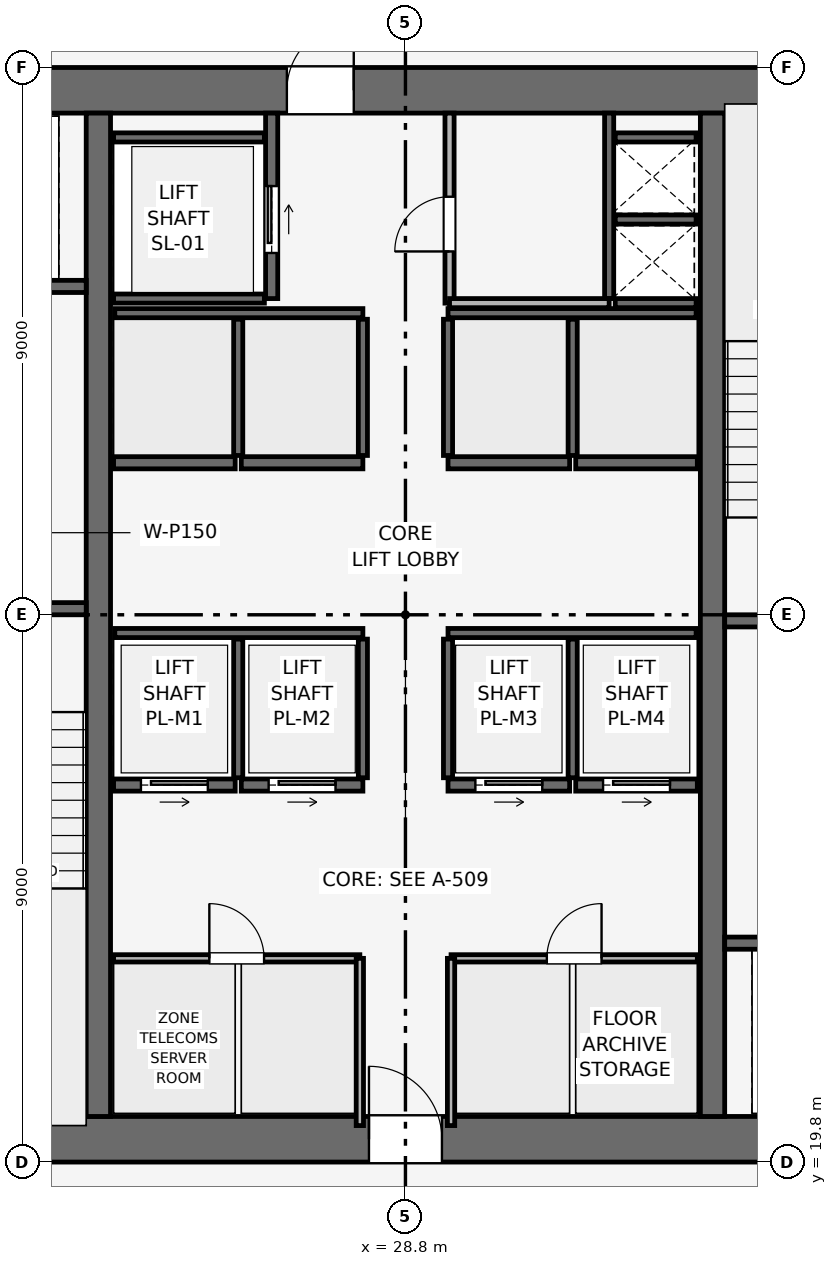
"""IFC4 building model, lengths in metres.
Left out: names, types, materials, properties, quantities, classifications, styles, units other than length and angle.
Written with IfcOpenShell. Run it as: python <this file> out.ifc"""

import sys

from ifc_helpers import new_model, si_unit, direction, frame, frame_2d, origin, place, context, subcontext, project, spatial, rectangle, extrude, element, fill, save


model = new_model("IFC4")
c1 = context("Model", 3, precision=1e-05, world=origin(), true_north=direction((0.0, 1.0)))
c2 = subcontext(c1, "Body", "Model", "MODEL_VIEW")
j1 = project(units=[si_unit("LENGTHUNIT", "METRE"), si_unit("PLANEANGLEUNIT", "RADIAN")], contexts=[c1])
p1 = place(None, origin())
s1 = spatial("IfcSite", under=j1, at=p1, CompositionType="ELEMENT")
p2 = place(p1, origin())
s2 = spatial("IfcBuilding", under=s1, at=p2, CompositionType="ELEMENT")
p3 = place(p2, frame((0.0, 0.0, 226.2)))
s3 = spatial("IfcBuildingStorey", under=s2, at=p3, CompositionType="ELEMENT", Elevation=226.2)
p4 = place(p3, frame((19.8, 20.175, 0.0), z_axis=(0.0, 0.0, 1.0), x_axis=(1.0, 0.0, 0.0)))
e1 = element("IfcWall", 1, at=p4, inside=s3, PredefinedType="SHEAR", context=c2, shape_type="SweptSolid", body=[
    extrude(rectangle(XDim=18.0, YDim=0.75, at=frame_2d((9.0, 0.0))), origin(), (0.0, 0.0, 1.0), 3.75),
])
p5 = place(p4, frame((8.4, 0.0, 0.0)))
e2 = element("IfcOpeningElement", 2, at=p5, cuts=e1, PredefinedType="OPENING", context=c2, shape_type="SweptSolid", body=[
    extrude(rectangle(XDim=1.2, YDim=2.2, at=frame_2d((0.6, 1.1))), frame((0.0, 0.385, 0.0), z_axis=(0.0, -1.0, 0.0), x_axis=(1.0, 0.0, 0.0)), (0.0, 0.0, 1.0), 0.77),
])
p6 = place(p3, frame((19.8, 37.425, 0.0), z_axis=(0.0, 0.0, 1.0), x_axis=(1.0, 0.0, 0.0)))
e3 = element("IfcWall", 3, at=p6, inside=s3, PredefinedType="SHEAR", context=c2, shape_type="SweptSolid", body=[
    extrude(rectangle(XDim=18.0, YDim=0.75, at=frame_2d((9.0, 0.0))), origin(), (0.0, 0.0, 1.0), 3.75),
])
p7 = place(p6, frame((7.05, 0.0, 0.0)))
e4 = element("IfcOpeningElement", 4, at=p7, cuts=e3, PredefinedType="OPENING", context=c2, shape_type="SweptSolid", body=[
    extrude(rectangle(XDim=1.1, YDim=2.15, at=frame_2d((0.55, 1.075))), frame((0.0, 0.385, 0.0), z_axis=(0.0, -1.0, 0.0), x_axis=(1.0, 0.0, 0.0)), (0.0, 0.0, 1.0), 0.77),
])
for number, where, z_axis, x_axis in (
    (5, (23.75, 20.55, 0.0), (0.0, 0.0, 1.0), (0.0, 1.0, 0.0)),
    (6, (33.85, 20.55, 0.0), (0.0, 0.0, 1.0), (0.0, 1.0, 0.0)),
):
    element("IfcWall", number, at=place(p3, frame(where, z_axis=z_axis, x_axis=x_axis)), inside=s3, PredefinedType="SHEAR", context=c2, shape_type="SweptSolid", body=[
        extrude(rectangle(XDim=16.5, YDim=0.4, at=frame_2d((8.25, 0.0))), origin(), (0.0, 0.0, 1.0), 3.75),
    ])
p8 = place(p3, frame((20.4, 28.9, 0.0), z_axis=(0.0, 0.0, 1.0), x_axis=(1.0, 0.0, 0.0)))
e7 = element("IfcWall", 7, at=p8, inside=s3, PredefinedType="SHEAR", context=c2, shape_type="SweptSolid", body=[
    extrude(rectangle(XDim=3.15, YDim=0.2, at=frame_2d((1.575, 0.0))), origin(), (0.0, 0.0, 1.0), 3.5),
])
p9 = place(p8, frame((0.8, 0.0, 0.0)))
e8 = element("IfcOpeningElement", 8, at=p9, cuts=e7, PredefinedType="OPENING", context=c2, shape_type="SweptSolid", body=[
    extrude(rectangle(XDim=1.0, YDim=2.1, at=frame_2d((0.5, 1.05))), frame((0.0, 0.11, 0.0), z_axis=(0.0, -1.0, 0.0), x_axis=(1.0, 0.0, 0.0)), (0.0, 0.0, 1.0), 0.22),
])
p10 = place(p3, frame((34.05, 28.7, 0.0), z_axis=(0.0, 0.0, 1.0), x_axis=(1.0, 0.0, 0.0)))
e9 = element("IfcWall", 9, at=p10, inside=s3, PredefinedType="SHEAR", context=c2, shape_type="SweptSolid", body=[
    extrude(rectangle(XDim=3.15, YDim=0.2, at=frame_2d((1.575, 0.0))), origin(), (0.0, 0.0, 1.0), 3.5),
])
p11 = place(p10, frame((0.8, 0.0, 0.0)))
e10 = element("IfcOpeningElement", 10, at=p11, cuts=e9, PredefinedType="OPENING", context=c2, shape_type="SweptSolid", body=[
    extrude(rectangle(XDim=1.0, YDim=2.1, at=frame_2d((0.5, 1.05))), frame((0.0, 0.11, 0.0), z_axis=(0.0, -1.0, 0.0), x_axis=(1.0, 0.0, 0.0)), (0.0, 0.0, 1.0), 0.22),
])
p12 = place(p3, frame((32.15, 34.0, 0.0), z_axis=(0.0, 0.0, 1.0), x_axis=(0.0, 1.0, 0.0)))
e11 = element("IfcWall", 11, at=p12, inside=s3, PredefinedType="SHEAR", context=c2, shape_type="SweptSolid", body=[
    extrude(rectangle(XDim=3.05, YDim=0.15, at=frame_2d((1.525, 0.0))), origin(), (0.0, 0.0, 1.0), 3.5),
])
for number, where, z_axis, x_axis in (
    (12, (32.25, 33.925, 0.0), (0.0, 0.0, 1.0), (1.0, 0.0, 0.0)),
    (13, (32.25, 35.3, 0.0), (0.0, 0.0, 1.0), (1.0, 0.0, 0.0)),
):
    element("IfcWall", number, at=place(p3, frame(where, z_axis=z_axis, x_axis=x_axis)), inside=s3, PredefinedType="SHEAR", context=c2, shape_type="SweptSolid", body=[
        extrude(rectangle(XDim=1.33, YDim=0.15, at=frame_2d((0.665, 0.0))), origin(), (0.0, 0.0, 1.0), 3.5),
    ])
p13 = place(p3, frame((20.5, 34.2, 0.0), z_axis=(0.0, 0.0, 1.0), x_axis=(1.0, 0.0, 0.0)))
e14 = element("IfcWall", 14, at=p13, inside=s3, PredefinedType="SHEAR", context=c2, shape_type="SweptSolid", body=[
    extrude(rectangle(XDim=3.05, YDim=0.2, at=frame_2d((1.525, 0.0))), origin(), (0.0, 0.0, 1.0), 3.5),
])
p14 = place(p13, frame((0.75, 0.0, 0.0)))
e15 = element("IfcOpeningElement", 15, at=p14, cuts=e14, PredefinedType="OPENING", context=c2, shape_type="SweptSolid", body=[
    extrude(rectangle(XDim=1.1, YDim=2.15, at=frame_2d((0.55, 1.075))), frame((0.0, 0.11, 0.0), z_axis=(0.0, -1.0, 0.0), x_axis=(1.0, 0.0, 0.0)), (0.0, 0.0, 1.0), 0.22),
])
p15 = place(p3, frame((34.05, 23.4, 0.0), z_axis=(0.0, 0.0, 1.0), x_axis=(1.0, 0.0, 0.0)))
e16 = element("IfcWall", 16, at=p15, inside=s3, PredefinedType="SHEAR", context=c2, shape_type="SweptSolid", body=[
    extrude(rectangle(XDim=3.05, YDim=0.2, at=frame_2d((1.525, 0.0))), origin(), (0.0, 0.0, 1.0), 3.5),
])
p16 = place(p15, frame((1.2, 0.0, 0.0)))
e17 = element("IfcOpeningElement", 17, at=p16, cuts=e16, PredefinedType="OPENING", context=c2, shape_type="SweptSolid", body=[
    extrude(rectangle(XDim=1.1, YDim=2.15, at=frame_2d((0.55, 1.075))), frame((0.0, 0.11, 0.0), z_axis=(0.0, -1.0, 0.0), x_axis=(1.0, 0.0, 0.0)), (0.0, 0.0, 1.0), 0.22),
])
p17 = place(p3, frame((26.6, 34.0, 0.0), z_axis=(0.0, 0.0, 1.0), x_axis=(0.0, 1.0, 0.0)))
e18 = element("IfcWall", 18, at=p17, inside=s3, PredefinedType="SHEAR", context=c2, shape_type="SweptSolid", body=[
    extrude(rectangle(XDim=3.05, YDim=0.2, at=frame_2d((1.525, 0.0))), origin(), (0.0, 0.0, 1.0), 3.5),
])
p18 = place(p17, frame((0.75, 0.0, 0.0)))
e19 = element("IfcOpeningElement", 19, at=p18, cuts=e18, PredefinedType="OPENING", context=c2, shape_type="SweptSolid", body=[
    extrude(rectangle(XDim=1.1, YDim=2.15, at=frame_2d((0.55, 1.075))), frame((0.0, 0.11, 0.0), z_axis=(0.0, -1.0, 0.0), x_axis=(1.0, 0.0, 0.0)), (0.0, 0.0, 1.0), 0.22),
])
for number, where, z_axis, x_axis in (
    (20, (24.0, 34.0, 0.0), (0.0, 0.0, 1.0), (1.0, 0.0, 0.0)),
    (21, (24.0, 36.65, 0.0), (0.0, 0.0, 1.0), (1.0, 0.0, 0.0)),
):
    element("IfcWall", number, at=place(p3, frame(where, z_axis=z_axis, x_axis=x_axis)), inside=s3, PredefinedType="SHEAR", context=c2, shape_type="SweptSolid", body=[
        extrude(rectangle(XDim=2.48, YDim=0.15, at=frame_2d((1.24, 0.0))), origin(), (0.0, 0.0, 1.0), 3.5),
    ])
p19 = place(p3, frame((24.0, 26.0, 0.0), z_axis=(0.0, 0.0, 1.0), x_axis=(1.0, 0.0, 0.0)))
e22 = element("IfcWall", 22, at=p19, inside=s3, PredefinedType="SHEAR", context=c2, shape_type="SweptSolid", body=[
    extrude(rectangle(XDim=2.0, YDim=0.2, at=frame_2d((1.0, 0.0))), origin(), (0.0, 0.0, 1.0), 3.5),
])
p20 = place(p19, frame((0.45, 0.0, 0.0)))
e23 = element("IfcOpeningElement", 23, at=p20, cuts=e22, PredefinedType="OPENING", context=c2, shape_type="SweptSolid", body=[
    extrude(rectangle(XDim=1.1, YDim=2.15, at=frame_2d((0.55, 1.075))), frame((0.0, 0.11, 0.0), z_axis=(0.0, -1.0, 0.0), x_axis=(1.0, 0.0, 0.0)), (0.0, 0.0, 1.0), 0.22),
])
p21 = place(p3, frame((26.1, 26.0, 0.0), z_axis=(0.0, 0.0, 1.0), x_axis=(1.0, 0.0, 0.0)))
e24 = element("IfcWall", 24, at=p21, inside=s3, PredefinedType="SHEAR", context=c2, shape_type="SweptSolid", body=[
    extrude(rectangle(XDim=2.0, YDim=0.2, at=frame_2d((1.0, 0.0))), origin(), (0.0, 0.0, 1.0), 3.5),
])
p22 = place(p21, frame((0.45, 0.0, 0.0)))
e25 = element("IfcOpeningElement", 25, at=p22, cuts=e24, PredefinedType="OPENING", context=c2, shape_type="SweptSolid", body=[
    extrude(rectangle(XDim=1.1, YDim=2.15, at=frame_2d((0.55, 1.075))), frame((0.0, 0.11, 0.0), z_axis=(0.0, -1.0, 0.0), x_axis=(1.0, 0.0, 0.0)), (0.0, 0.0, 1.0), 0.22),
])
p23 = place(p3, frame((29.5, 26.0, 0.0), z_axis=(0.0, 0.0, 1.0), x_axis=(1.0, 0.0, 0.0)))
e26 = element("IfcWall", 26, at=p23, inside=s3, PredefinedType="SHEAR", context=c2, shape_type="SweptSolid", body=[
    extrude(rectangle(XDim=2.0, YDim=0.2, at=frame_2d((1.0, 0.0))), origin(), (0.0, 0.0, 1.0), 3.5),
])
p24 = place(p23, frame((0.45, 0.0, 0.0)))
e27 = element("IfcOpeningElement", 27, at=p24, cuts=e26, PredefinedType="OPENING", context=c2, shape_type="SweptSolid", body=[
    extrude(rectangle(XDim=1.1, YDim=2.15, at=frame_2d((0.55, 1.075))), frame((0.0, 0.11, 0.0), z_axis=(0.0, -1.0, 0.0), x_axis=(1.0, 0.0, 0.0)), (0.0, 0.0, 1.0), 0.22),
])
p25 = place(p3, frame((31.6, 26.0, 0.0), z_axis=(0.0, 0.0, 1.0), x_axis=(1.0, 0.0, 0.0)))
e28 = element("IfcWall", 28, at=p25, inside=s3, PredefinedType="SHEAR", context=c2, shape_type="SweptSolid", body=[
    extrude(rectangle(XDim=2.0, YDim=0.2, at=frame_2d((1.0, 0.0))), origin(), (0.0, 0.0, 1.0), 3.5),
])
p26 = place(p25, frame((0.45, 0.0, 0.0)))
e29 = element("IfcOpeningElement", 29, at=p26, cuts=e28, PredefinedType="OPENING", context=c2, shape_type="SweptSolid", body=[
    extrude(rectangle(XDim=1.1, YDim=2.15, at=frame_2d((0.55, 1.075))), frame((0.0, 0.11, 0.0), z_axis=(0.0, -1.0, 0.0), x_axis=(1.0, 0.0, 0.0)), (0.0, 0.0, 1.0), 0.22),
])
for number, where, z_axis, x_axis in (
    (30, (24.0, 31.3, 0.0), (0.0, 0.0, 1.0), (1.0, 0.0, 0.0)),
    (31, (26.1, 31.3, 0.0), (0.0, 0.0, 1.0), (1.0, 0.0, 0.0)),
    (32, (29.5, 31.3, 0.0), (0.0, 0.0, 1.0), (1.0, 0.0, 0.0)),
    (33, (31.6, 31.3, 0.0), (0.0, 0.0, 1.0), (1.0, 0.0, 0.0)),
):
    element("IfcWall", number, at=place(p3, frame(where, z_axis=z_axis, x_axis=x_axis)), inside=s3, PredefinedType="SHEAR", context=c2, shape_type="SweptSolid", body=[
        extrude(rectangle(XDim=2.0, YDim=0.2, at=frame_2d((1.0, 0.0))), origin(), (0.0, 0.0, 1.0), 3.5),
    ])
p27 = place(p3, frame((32.25, 36.65, 0.0), z_axis=(0.0, 0.0, 1.0), x_axis=(1.0, 0.0, 0.0)))
e34 = element("IfcWall", 34, at=p27, inside=s3, PredefinedType="SHEAR", context=c2, shape_type="SweptSolid", body=[
    extrude(rectangle(XDim=1.33, YDim=0.15, at=frame_2d((0.665, 0.0))), origin(), (0.0, 0.0, 1.0), 3.5),
])
for number, where, z_axis, x_axis in (
    (35, (24.02, 28.5, 0.0), (0.0, 0.0, 1.0), (1.0, 0.0, 0.0)),
    (36, (29.5, 28.5, 0.0), (0.0, 0.0, 1.0), (1.0, 0.0, 0.0)),
):
    element("IfcWall", number, at=place(p3, frame(where, z_axis=z_axis, x_axis=x_axis)), inside=s3, PredefinedType="SHEAR", context=c2, shape_type="SweptSolid", body=[
        extrude(rectangle(XDim=4.08, YDim=0.15, at=frame_2d((2.04, 0.0))), origin(), (0.0, 0.0, 1.0), 3.5),
    ])
for number, where, z_axis, x_axis in (
    (37, (26.05, 26.12, 0.0), (0.0, 0.0, 1.0), (0.0, 1.0, 0.0)),
    (38, (28.1, 26.12, 0.0), (0.0, 0.0, 1.0), (0.0, 1.0, 0.0)),
    (39, (29.5, 26.12, 0.0), (0.0, 0.0, 1.0), (0.0, 1.0, 0.0)),
    (40, (31.55, 26.12, 0.0), (0.0, 0.0, 1.0), (0.0, 1.0, 0.0)),
):
    element("IfcWall", number, at=place(p3, frame(where, z_axis=z_axis, x_axis=x_axis)), inside=s3, PredefinedType="SHEAR", context=c2, shape_type="SweptSolid", body=[
        extrude(rectangle(XDim=2.28, YDim=0.15, at=frame_2d((1.14, 0.0))), origin(), (0.0, 0.0, 1.0), 3.5),
    ])
for number, where, z_axis, x_axis in (
    (41, (24.02, 33.76, 0.0), (0.0, 0.0, 1.0), (1.0, 0.0, 0.0)),
    (42, (29.5, 33.76, 0.0), (0.0, 0.0, 1.0), (1.0, 0.0, 0.0)),
):
    element("IfcWall", number, at=place(p3, frame(where, z_axis=z_axis, x_axis=x_axis)), inside=s3, PredefinedType="SHEAR", context=c2, shape_type="SweptSolid", body=[
        extrude(rectangle(XDim=4.08, YDim=0.15, at=frame_2d((2.04, 0.0))), origin(), (0.0, 0.0, 1.0), 3.5),
    ])
for number, where, z_axis, x_axis in (
    (43, (26.05, 31.42, 0.0), (0.0, 0.0, 1.0), (0.0, 1.0, 0.0)),
    (44, (28.1, 31.42, 0.0), (0.0, 0.0, 1.0), (0.0, 1.0, 0.0)),
    (45, (29.5, 31.42, 0.0), (0.0, 0.0, 1.0), (0.0, 1.0, 0.0)),
    (46, (31.55, 31.42, 0.0), (0.0, 0.0, 1.0), (0.0, 1.0, 0.0)),
):
    element("IfcWall", number, at=place(p3, frame(where, z_axis=z_axis, x_axis=x_axis)), inside=s3, PredefinedType="SHEAR", context=c2, shape_type="SweptSolid", body=[
        extrude(rectangle(XDim=2.24, YDim=0.15, at=frame_2d((1.12, 0.0))), origin(), (0.0, 0.0, 1.0), 3.5),
    ])
p28 = place(p3, frame((29.525, 33.925, 0.0), z_axis=(0.0, 0.0, 1.0), x_axis=(0.0, 1.0, 0.0)))
e47 = element("IfcWall", 47, at=p28, inside=s3, PredefinedType="PARTITIONING", context=c2, shape_type="SweptSolid", body=[
    extrude(rectangle(XDim=3.125, YDim=0.15, at=frame_2d((1.562, 0.0))), origin(), (0.0, 0.0, 1.0), 3.5),
])
p29 = place(p28, frame((0.85, 0.0, 0.0)))
e48 = element("IfcOpeningElement", 48, at=p29, cuts=e47, PredefinedType="OPENING", context=c2, shape_type="SweptSolid", body=[
    extrude(rectangle(XDim=0.9, YDim=2.1, at=frame_2d((0.45, 1.05))), frame((0.0, 0.085, 0.0), z_axis=(0.0, -1.0, 0.0), x_axis=(1.0, 0.0, 0.0)), (0.0, 0.0, 1.0), 0.17),
])
p30 = place(p3, frame((29.525, 33.925, 0.0), z_axis=(0.0, 0.0, 1.0), x_axis=(1.0, 0.0, 0.0)))
e49 = element("IfcWall", 49, at=p30, inside=s3, PredefinedType="PARTITIONING", context=c2, shape_type="SweptSolid", body=[
    extrude(rectangle(XDim=2.625, YDim=0.15, at=frame_2d((1.312, 0.0))), origin(), (0.0, 0.0, 1.0), 3.5),
])
p31 = place(p3, frame((24.0, 23.15, 0.0), z_axis=(0.0, 0.0, 1.0), x_axis=(1.0, 0.0, 0.0)))
e50 = element("IfcWall", 50, at=p31, inside=s3, PredefinedType="PARTITIONING", context=c2, shape_type="SweptSolid", body=[
    extrude(rectangle(XDim=4.05, YDim=0.12, at=frame_2d((2.025, 0.0))), origin(), (0.0, 0.0, 1.0), 3.5),
])
p32 = place(p31, frame((1.575, 0.0, 0.0)))
e51 = element("IfcOpeningElement", 51, at=p32, cuts=e50, PredefinedType="OPENING", context=c2, shape_type="SweptSolid", body=[
    extrude(rectangle(XDim=0.9, YDim=2.1, at=frame_2d((0.45, 1.05))), frame((0.0, 0.07, 0.0), z_axis=(0.0, -1.0, 0.0), x_axis=(1.0, 0.0, 0.0)), (0.0, 0.0, 1.0), 0.14),
])
p33 = place(p3, frame((28.05, 20.4, 0.0), z_axis=(0.0, 0.0, 1.0), x_axis=(0.0, 1.0, 0.0)))
e52 = element("IfcWall", 52, at=p33, inside=s3, PredefinedType="PARTITIONING", context=c2, shape_type="SweptSolid", body=[
    extrude(rectangle(XDim=2.75, YDim=0.12, at=frame_2d((1.375, 0.0))), origin(), (0.0, 0.0, 1.0), 3.5),
])
p34 = place(p3, frame((29.55, 23.15, 0.0), z_axis=(0.0, 0.0, 1.0), x_axis=(1.0, 0.0, 0.0)))
e53 = element("IfcWall", 53, at=p34, inside=s3, PredefinedType="PARTITIONING", context=c2, shape_type="SweptSolid", body=[
    extrude(rectangle(XDim=4.05, YDim=0.12, at=frame_2d((2.025, 0.0))), origin(), (0.0, 0.0, 1.0), 3.5),
])
p35 = place(p34, frame((1.575, 0.0, 0.0)))
e54 = element("IfcOpeningElement", 54, at=p35, cuts=e53, PredefinedType="OPENING", context=c2, shape_type="SweptSolid", body=[
    extrude(rectangle(XDim=0.9, YDim=2.1, at=frame_2d((0.45, 1.05))), frame((0.0, 0.07, 0.0), z_axis=(0.0, -1.0, 0.0), x_axis=(1.0, 0.0, 0.0)), (0.0, 0.0, 1.0), 0.14),
])
p36 = place(p3, frame((29.55, 20.4, 0.0), z_axis=(0.0, 0.0, 1.0), x_axis=(0.0, 1.0, 0.0)))
e55 = element("IfcWall", 55, at=p36, inside=s3, PredefinedType="PARTITIONING", context=c2, shape_type="SweptSolid", body=[
    extrude(rectangle(XDim=2.75, YDim=0.12, at=frame_2d((1.375, 0.0))), origin(), (0.0, 0.0, 1.0), 3.5),
])
p37 = place(p18, origin())
e56 = element("IfcDoor", 56, at=p37, inside=s3, OperationType="SLIDING_TO_RIGHT", PredefinedType="DOOR", context=c2, shape_type="SweptSolid", body=[
    extrude(rectangle(XDim=1.1, YDim=2.15, at=frame_2d((0.55, 1.075))), frame((0.0, 0.025, 0.0), z_axis=(0.0, -1.0, 0.0), x_axis=(1.0, 0.0, 0.0)), (0.0, 0.0, 1.0), 0.05),
])
fill(e19, e56)
p38 = place(p20, origin())
e57 = element("IfcDoor", 57, at=p38, inside=s3, OperationType="SLIDING_TO_RIGHT", PredefinedType="DOOR", context=c2, shape_type="SweptSolid", body=[
    extrude(rectangle(XDim=1.1, YDim=2.15, at=frame_2d((0.55, 1.075))), frame((0.0, 0.025, 0.0), z_axis=(0.0, -1.0, 0.0), x_axis=(1.0, 0.0, 0.0)), (0.0, 0.0, 1.0), 0.05),
])
fill(e23, e57)
p39 = place(p22, origin())
e58 = element("IfcDoor", 58, at=p39, inside=s3, OperationType="SLIDING_TO_RIGHT", PredefinedType="DOOR", context=c2, shape_type="SweptSolid", body=[
    extrude(rectangle(XDim=1.1, YDim=2.15, at=frame_2d((0.55, 1.075))), frame((0.0, 0.025, 0.0), z_axis=(0.0, -1.0, 0.0), x_axis=(1.0, 0.0, 0.0)), (0.0, 0.0, 1.0), 0.05),
])
fill(e25, e58)
p40 = place(p24, origin())
e59 = element("IfcDoor", 59, at=p40, inside=s3, OperationType="SLIDING_TO_RIGHT", PredefinedType="DOOR", context=c2, shape_type="SweptSolid", body=[
    extrude(rectangle(XDim=1.1, YDim=2.15, at=frame_2d((0.55, 1.075))), frame((0.0, 0.025, 0.0), z_axis=(0.0, -1.0, 0.0), x_axis=(1.0, 0.0, 0.0)), (0.0, 0.0, 1.0), 0.05),
])
fill(e27, e59)
p41 = place(p26, origin())
e60 = element("IfcDoor", 60, at=p41, inside=s3, OperationType="SLIDING_TO_RIGHT", PredefinedType="DOOR", context=c2, shape_type="SweptSolid", body=[
    extrude(rectangle(XDim=1.1, YDim=2.15, at=frame_2d((0.55, 1.075))), frame((0.0, 0.025, 0.0), z_axis=(0.0, -1.0, 0.0), x_axis=(1.0, 0.0, 0.0)), (0.0, 0.0, 1.0), 0.05),
])
fill(e29, e60)
p42 = place(p29, origin())
e61 = element("IfcDoor", 61, at=p42, inside=s3, OperationType="SINGLE_SWING_LEFT", PredefinedType="DOOR", context=c2, shape_type="SweptSolid", body=[
    extrude(rectangle(XDim=0.9, YDim=2.1, at=frame_2d((0.45, 1.05))), frame((0.0, 0.025, 0.0), z_axis=(0.0, -1.0, 0.0), x_axis=(1.0, 0.0, 0.0)), (0.0, 0.0, 1.0), 0.05),
])
fill(e48, e61)
p43 = place(p32, origin())
e62 = element("IfcDoor", 62, at=p43, inside=s3, OperationType="SINGLE_SWING_LEFT", PredefinedType="DOOR", context=c2, shape_type="SweptSolid", body=[
    extrude(rectangle(XDim=0.9, YDim=2.1, at=frame_2d((0.45, 1.05))), frame((0.0, 0.025, 0.0), z_axis=(0.0, -1.0, 0.0), x_axis=(1.0, 0.0, 0.0)), (0.0, 0.0, 1.0), 0.05),
])
fill(e51, e62)
p44 = place(p35, origin())
e63 = element("IfcDoor", 63, at=p44, inside=s3, OperationType="SINGLE_SWING_RIGHT", PredefinedType="DOOR", context=c2, shape_type="SweptSolid", body=[
    extrude(rectangle(XDim=0.9, YDim=2.1, at=frame_2d((0.45, 1.05))), frame((0.0, 0.025, 0.0), z_axis=(0.0, -1.0, 0.0), x_axis=(1.0, 0.0, 0.0)), (0.0, 0.0, 1.0), 0.05),
])
fill(e54, e63)
p45 = place(p5, origin())
e64 = element("IfcDoor", 64, at=p45, inside=s3, OperationType="SINGLE_SWING_LEFT", PredefinedType="DOOR", context=c2, shape_type="SweptSolid", body=[
    extrude(rectangle(XDim=1.2, YDim=2.2, at=frame_2d((0.6, 1.1))), frame((0.0, 0.025, 0.0), z_axis=(0.0, -1.0, 0.0), x_axis=(1.0, 0.0, 0.0)), (0.0, 0.0, 1.0), 0.05),
])
fill(e2, e64)
p46 = place(p7, origin())
e65 = element("IfcDoor", 65, at=p46, inside=s3, OperationType="SINGLE_SWING_RIGHT", PredefinedType="DOOR", context=c2, shape_type="SweptSolid", body=[
    extrude(rectangle(XDim=1.1, YDim=2.15, at=frame_2d((0.55, 1.075))), frame((0.0, 0.025, 0.0), z_axis=(0.0, -1.0, 0.0), x_axis=(1.0, 0.0, 0.0)), (0.0, 0.0, 1.0), 0.05),
])
fill(e4, e65)
save(model, sys.argv[1])
